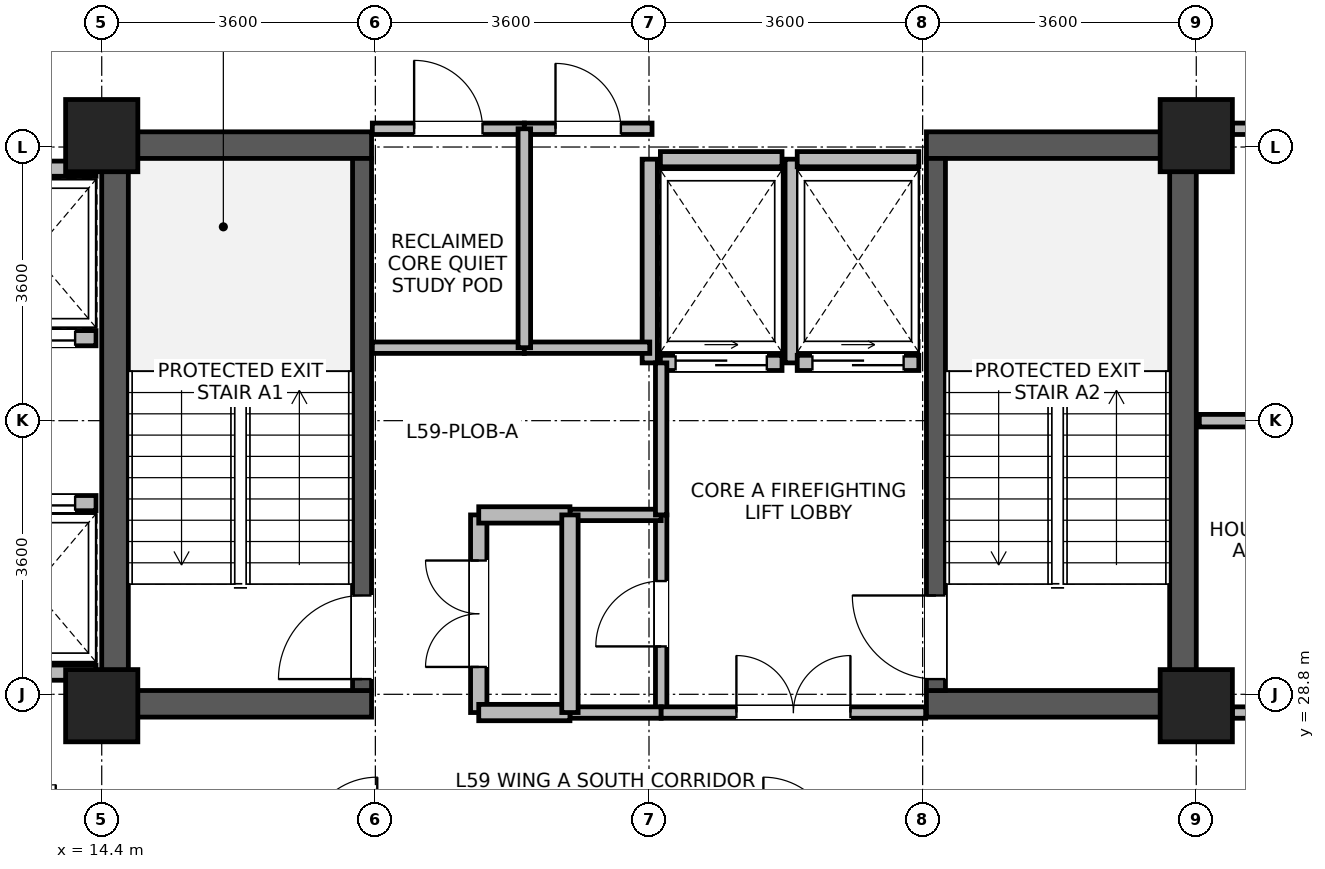
"""IFC4 building model, lengths in metres.
Left out: names, types, materials, properties, quantities, classifications, styles, units other than length and angle.
Written with IfcOpenShell. Run it as: python <this file> out.ifc"""

import sys

from ifc_helpers import new_model, si_unit, direction, frame, frame_2d, origin, origin_2d, place, context, subcontext, project, spatial, rectangle, extrude, source, transform, mapped, element, fill, save


model = new_model("IFC4")
c1 = context("Model", 3, precision=1e-05, world=origin(), true_north=direction((0.0, 1.0)))
c2 = subcontext(c1, "Body", "Model", "MODEL_VIEW")
j1 = project(units=[si_unit("LENGTHUNIT", "METRE"), si_unit("PLANEANGLEUNIT", "RADIAN")], contexts=[c1])
p1 = place(None, origin())
s1 = spatial("IfcSite", under=j1, at=p1, CompositionType="ELEMENT")
p2 = place(p1, origin())
s2 = spatial("IfcBuilding", under=s1, at=p2, CompositionType="ELEMENT")
p3 = place(p2, frame((0.0, 0.0, 231.4)))
s3 = spatial("IfcBuildingStorey", under=s2, at=p3, CompositionType="ELEMENT", Elevation=231.4)
for number, where, z_axis, x_axis in (
    (1, (14.575, 28.5, 0.0), (0.0, 0.0, 1.0), (0.0, 1.0, 0.0)),
    (2, (28.625, 28.5, 0.0), (0.0, 0.0, 1.0), (0.0, 1.0, 0.0)),
):
    element("IfcWall", number, at=place(p3, frame(where, z_axis=z_axis, x_axis=x_axis)), inside=s3, PredefinedType="SHEAR", context=c2, shape_type="SweptSolid", body=[
        extrude(rectangle(XDim=7.7, YDim=0.35, at=frame_2d((3.85, 0.0))), origin(), (0.0, 0.0, 1.0), 3.44),
    ])
for number, where, z_axis, x_axis in (
    (3, (14.75, 28.675, 0.0), (0.0, 0.0, 1.0), (1.0, 0.0, 0.0)),
    (4, (25.25, 28.675, 0.0), (0.0, 0.0, 1.0), (1.0, 0.0, 0.0)),
    (5, (14.75, 36.025, 0.0), (0.0, 0.0, 1.0), (1.0, 0.0, 0.0)),
    (6, (25.25, 36.025, 0.0), (0.0, 0.0, 1.0), (1.0, 0.0, 0.0)),
):
    element("IfcWall", number, at=place(p3, frame(where, z_axis=z_axis, x_axis=x_axis)), inside=s3, PredefinedType="SHEAR", context=c2, shape_type="SweptSolid", body=[
        extrude(rectangle(XDim=3.2, YDim=0.35, at=frame_2d((1.6, 0.0))), origin(), (0.0, 0.0, 1.0), 3.44),
    ])
p4 = place(p3, frame((17.825, 28.85, 0.0), z_axis=(0.0, 0.0, 1.0), x_axis=(0.0, 1.0, 0.0)))
e7 = element("IfcWall", 7, at=p4, inside=s3, PredefinedType="SHEAR", context=c2, shape_type="SweptSolid", body=[
    extrude(rectangle(XDim=7.0, YDim=0.25, at=frame_2d((3.5, 0.0))), origin(), (0.0, 0.0, 1.0), 3.44),
])
p5 = place(p4, frame((0.15, 0.0, 0.0)))
e8 = element("IfcOpeningElement", 8, at=p5, cuts=e7, PredefinedType="OPENING", context=c2, shape_type="SweptSolid", body=[
    extrude(rectangle(XDim=1.1, YDim=2.08, at=frame_2d((0.55, 1.04))), frame((0.0, 0.135, 0.0), z_axis=(0.0, -1.0, 0.0), x_axis=(1.0, 0.0, 0.0)), (0.0, 0.0, 1.0), 0.27),
])
p6 = place(p3, frame((25.375, 28.85, 0.0), z_axis=(0.0, 0.0, 1.0), x_axis=(0.0, 1.0, 0.0)))
e9 = element("IfcWall", 9, at=p6, inside=s3, PredefinedType="SHEAR", context=c2, shape_type="SweptSolid", body=[
    extrude(rectangle(XDim=7.0, YDim=0.25, at=frame_2d((3.5, 0.0))), origin(), (0.0, 0.0, 1.0), 3.44),
])
p7 = place(p6, frame((0.15, 0.0, 0.0)))
e10 = element("IfcOpeningElement", 10, at=p7, cuts=e9, PredefinedType="OPENING", context=c2, shape_type="SweptSolid", body=[
    extrude(rectangle(XDim=1.1, YDim=2.08, at=frame_2d((0.55, 1.04))), frame((0.0, 0.135, 0.0), z_axis=(0.0, -1.0, 0.0), x_axis=(1.0, 0.0, 0.0)), (0.0, 0.0, 1.0), 0.27),
])
m1 = source(origin(), c2, "Body", "SweptSolid", [
    extrude(rectangle(XDim=0.95, YDim=0.95, at=origin_2d()), origin(), (0.0, 0.0, 1.0), 3.7),
])
for number, where, z_axis, x_axis in (
    (11, (14.4, 28.65, 0.0), (0.0, 0.0, 1.0), (1.0, 0.0, 0.0)),
    (12, (14.4, 36.15, 0.0), (0.0, 0.0, 1.0), (1.0, 0.0, 0.0)),
    (13, (28.8, 28.65, 0.0), (0.0, 0.0, 1.0), (1.0, 0.0, 0.0)),
    (14, (28.8, 36.15, 0.0), (0.0, 0.0, 1.0), (1.0, 0.0, 0.0)),
):
    element("IfcColumn", number, at=place(p3, frame(where, z_axis=z_axis, x_axis=x_axis)), inside=s3, PredefinedType="COLUMN", context=c2, shape_type="MappedRepresentation", body=[
        mapped(m1, transform((0.0, 0.0, 0.0), x_axis=(1.0, 0.0, 0.0), y_axis=(0.0, 1.0, 0.0), z_axis=(0.0, 0.0, 1.0), scale=1.0)),
    ])
p8 = place(p3, frame((12.675, 33.485, 0.0), z_axis=(0.0, 0.0, 1.0), x_axis=(1.0, 0.0, 0.0)))
e15 = element("IfcWall", 15, at=p8, inside=s3, PredefinedType="PARTITIONING", context=c2, shape_type="SweptSolid", body=[
    extrude(rectangle(XDim=1.65, YDim=0.2, at=frame_2d((0.825, 0.0))), origin(), (0.0, 0.0, 1.0), 3.42),
])
p9 = place(p8, frame((0.275, 0.0, 0.0)))
e16 = element("IfcOpeningElement", 16, at=p9, cuts=e15, PredefinedType="OPENING", context=c2, shape_type="SweptSolid", body=[
    extrude(rectangle(XDim=1.1, YDim=2.12, at=frame_2d((0.55, 1.06))), frame((0.0, 0.11, 0.0), z_axis=(0.0, -1.0, 0.0), x_axis=(1.0, 0.0, 0.0)), (0.0, 0.0, 1.0), 0.22),
])
for number, where, z_axis, x_axis in (
    (17, (12.675, 35.715, 0.0), (0.0, 0.0, 1.0), (1.0, 0.0, 0.0)),
    (18, (12.675, 29.085, 0.0), (0.0, 0.0, 1.0), (1.0, 0.0, 0.0)),
):
    element("IfcWall", number, at=place(p3, frame(where, z_axis=z_axis, x_axis=x_axis)), inside=s3, PredefinedType="PARTITIONING", context=c2, shape_type="SweptSolid", body=[
        extrude(rectangle(XDim=1.65, YDim=0.2, at=frame_2d((0.825, 0.0))), origin(), (0.0, 0.0, 1.0), 3.42),
    ])
p10 = place(p3, frame((12.675, 31.315, 0.0), z_axis=(0.0, 0.0, 1.0), x_axis=(1.0, 0.0, 0.0)))
e19 = element("IfcWall", 19, at=p10, inside=s3, PredefinedType="PARTITIONING", context=c2, shape_type="SweptSolid", body=[
    extrude(rectangle(XDim=1.65, YDim=0.2, at=frame_2d((0.825, 0.0))), origin(), (0.0, 0.0, 1.0), 3.42),
])
p11 = place(p10, frame((0.275, 0.0, 0.0)))
e20 = element("IfcOpeningElement", 20, at=p11, cuts=e19, PredefinedType="OPENING", context=c2, shape_type="SweptSolid", body=[
    extrude(rectangle(XDim=1.1, YDim=2.12, at=frame_2d((0.55, 1.06))), frame((0.0, 0.11, 0.0), z_axis=(0.0, -1.0, 0.0), x_axis=(1.0, 0.0, 0.0)), (0.0, 0.0, 1.0), 0.22),
])
p12 = place(p3, frame((21.75, 33.16, 0.0), z_axis=(0.0, 0.0, 1.0), x_axis=(1.0, 0.0, 0.0)))
e21 = element("IfcWall", 21, at=p12, inside=s3, PredefinedType="PARTITIONING", context=c2, shape_type="SweptSolid", body=[
    extrude(rectangle(XDim=1.6, YDim=0.2, at=frame_2d((0.8, 0.0))), origin(), (0.0, 0.0, 1.0), 3.42),
])
p13 = place(p12, frame((0.2, 0.0, 0.0)))
e22 = element("IfcOpeningElement", 22, at=p13, cuts=e21, PredefinedType="OPENING", context=c2, shape_type="SweptSolid", body=[
    extrude(rectangle(XDim=1.2, YDim=2.12, at=frame_2d((0.6, 1.06))), frame((0.0, 0.11, 0.0), z_axis=(0.0, -1.0, 0.0), x_axis=(1.0, 0.0, 0.0)), (0.0, 0.0, 1.0), 0.22),
])
p14 = place(p3, frame((21.75, 35.84, 0.0), z_axis=(0.0, 0.0, 1.0), x_axis=(1.0, 0.0, 0.0)))
e23 = element("IfcWall", 23, at=p14, inside=s3, PredefinedType="PARTITIONING", context=c2, shape_type="SweptSolid", body=[
    extrude(rectangle(XDim=1.6, YDim=0.2, at=frame_2d((0.8, 0.0))), origin(), (0.0, 0.0, 1.0), 2.52),
])
for number, where, z_axis, x_axis in (
    (24, (21.61, 33.16, 0.0), (0.0, 0.0, 1.0), (0.0, 1.0, 0.0)),
    (25, (23.49, 33.16, 0.0), (0.0, 0.0, 1.0), (0.0, 1.0, 0.0)),
):
    element("IfcWall", number, at=place(p3, frame(where, z_axis=z_axis, x_axis=x_axis)), inside=s3, PredefinedType="PARTITIONING", context=c2, shape_type="SweptSolid", body=[
        extrude(rectangle(XDim=2.68, YDim=0.2, at=frame_2d((1.34, 0.0))), origin(), (0.0, 0.0, 1.0), 3.42),
    ])
p15 = place(p3, frame((23.55, 33.16, 0.0), z_axis=(0.0, 0.0, 1.0), x_axis=(1.0, 0.0, 0.0)))
e26 = element("IfcWall", 26, at=p15, inside=s3, PredefinedType="PARTITIONING", context=c2, shape_type="SweptSolid", body=[
    extrude(rectangle(XDim=1.6, YDim=0.2, at=frame_2d((0.8, 0.0))), origin(), (0.0, 0.0, 1.0), 3.42),
])
p16 = place(p15, frame((0.2, 0.0, 0.0)))
e27 = element("IfcOpeningElement", 27, at=p16, cuts=e26, PredefinedType="OPENING", context=c2, shape_type="SweptSolid", body=[
    extrude(rectangle(XDim=1.2, YDim=2.12, at=frame_2d((0.6, 1.06))), frame((0.0, 0.11, 0.0), z_axis=(0.0, -1.0, 0.0), x_axis=(1.0, 0.0, 0.0)), (0.0, 0.0, 1.0), 0.22),
])
p17 = place(p3, frame((23.55, 35.84, 0.0), z_axis=(0.0, 0.0, 1.0), x_axis=(1.0, 0.0, 0.0)))
e28 = element("IfcWall", 28, at=p17, inside=s3, PredefinedType="PARTITIONING", context=c2, shape_type="SweptSolid", body=[
    extrude(rectangle(XDim=1.6, YDim=0.2, at=frame_2d((0.8, 0.0))), origin(), (0.0, 0.0, 1.0), 2.52),
])
p18 = place(p3, frame((29.275, 36.24, 0.0), z_axis=(0.0, 0.0, 1.0), x_axis=(1.0, 0.0, 0.0)))
e29 = element("IfcWall", 29, at=p18, inside=s3, PredefinedType="PARTITIONING", context=c2, shape_type="SweptSolid", body=[
    extrude(rectangle(XDim=4.085, YDim=0.15, at=frame_2d((2.042, 0.0))), origin(), (0.0, 0.0, 1.0), 2.87),
])
p19 = place(p18, frame((1.393, 0.0, 0.0)))
e30 = element("IfcOpeningElement", 30, at=p19, cuts=e29, PredefinedType="OPENING", context=c2, shape_type="SweptSolid", body=[
    extrude(rectangle(XDim=1.3, YDim=2.12, at=frame_2d((0.65, 1.06))), frame((0.0, 0.085, 0.0), z_axis=(0.0, -1.0, 0.0), x_axis=(1.0, 0.0, 0.0)), (0.0, 0.0, 1.0), 0.17),
])
p20 = place(p3, frame((19.36, 28.56, 0.0), z_axis=(0.0, 0.0, 1.0), x_axis=(0.0, 1.0, 0.0)))
e31 = element("IfcWall", 31, at=p20, inside=s3, PredefinedType="PARTITIONING", context=c2, shape_type="SweptSolid", body=[
    extrude(rectangle(XDim=2.6, YDim=0.215, at=frame_2d((1.3, 0.0))), origin(), (0.0, 0.0, 1.0), 3.42),
])
p21 = place(p20, frame((0.6, 0.0, 0.0)))
e32 = element("IfcOpeningElement", 32, at=p21, cuts=e31, PredefinedType="OPENING", context=c2, shape_type="SweptSolid", body=[
    extrude(rectangle(XDim=1.4, YDim=2.15, at=frame_2d((0.7, 1.075))), frame((0.0, 0.118, 0.0), z_axis=(0.0, -1.0, 0.0), x_axis=(1.0, 0.0, 0.0)), (0.0, 0.0, 1.0), 0.235),
])
p22 = place(p3, frame((21.76, 28.56, 0.0), z_axis=(0.0, 0.0, 1.0), x_axis=(0.0, 1.0, 0.0)))
e33 = element("IfcWall", 33, at=p22, inside=s3, PredefinedType="PARTITIONING", context=c2, shape_type="SweptSolid", body=[
    extrude(rectangle(XDim=2.6, YDim=0.15, at=frame_2d((1.3, 0.0))), origin(), (0.0, 0.0, 1.0), 3.42),
])
p23 = place(p22, frame((0.87, 0.0, 0.0)))
e34 = element("IfcOpeningElement", 34, at=p23, cuts=e33, PredefinedType="OPENING", context=c2, shape_type="SweptSolid", body=[
    extrude(rectangle(XDim=0.86, YDim=2.02, at=frame_2d((0.43, 1.01))), frame((0.0, 0.085, 0.0), z_axis=(0.0, -1.0, 0.0), x_axis=(1.0, 0.0, 0.0)), (0.0, 0.0, 1.0), 0.17),
])
p24 = place(p3, frame((29.275, 28.56, 0.0), z_axis=(0.0, 0.0, 1.0), x_axis=(1.0, 0.0, 0.0)))
e35 = element("IfcWall", 35, at=p24, inside=s3, PredefinedType="PARTITIONING", context=c2, shape_type="SweptSolid", body=[
    extrude(rectangle(XDim=1.825, YDim=0.15, at=frame_2d((0.913, 0.0))), origin(), (0.0, 0.0, 1.0), 2.87),
])
p25 = place(p24, frame((0.482, 0.0, 0.0)))
e36 = element("IfcOpeningElement", 36, at=p25, cuts=e35, PredefinedType="OPENING", context=c2, shape_type="SweptSolid", body=[
    extrude(rectangle(XDim=0.86, YDim=2.02, at=frame_2d((0.43, 1.01))), frame((0.0, 0.085, 0.0), z_axis=(0.0, -1.0, 0.0), x_axis=(1.0, 0.0, 0.0)), (0.0, 0.0, 1.0), 0.17),
])
p26 = place(p3, frame((17.96, 33.36, 0.0), z_axis=(0.0, 0.0, 1.0), x_axis=(1.0, 0.0, 0.0)))
e37 = element("IfcWall", 37, at=p26, inside=s3, PredefinedType="PARTITIONING", context=c2, shape_type="SweptSolid", body=[
    extrude(rectangle(XDim=2.0, YDim=0.15, at=frame_2d((1.0, 0.0))), origin(), (0.0, 0.0, 1.0), 3.42),
])
p27 = place(p3, frame((17.96, 36.24, 0.0), z_axis=(0.0, 0.0, 1.0), x_axis=(1.0, 0.0, 0.0)))
e38 = element("IfcWall", 38, at=p27, inside=s3, PredefinedType="PARTITIONING", context=c2, shape_type="SweptSolid", body=[
    extrude(rectangle(XDim=2.0, YDim=0.15, at=frame_2d((1.0, 0.0))), origin(), (0.0, 0.0, 1.0), 2.52),
])
p28 = place(p27, frame((0.55, 0.0, 0.0)))
e39 = element("IfcOpeningElement", 39, at=p28, cuts=e38, PredefinedType="OPENING", context=c2, shape_type="SweptSolid", body=[
    extrude(rectangle(XDim=0.9, YDim=2.08, at=frame_2d((0.45, 1.04))), frame((0.0, 0.085, 0.0), z_axis=(0.0, -1.0, 0.0), x_axis=(1.0, 0.0, 0.0)), (0.0, 0.0, 1.0), 0.17),
])
p29 = place(p3, frame((19.96, 33.36, 0.0), z_axis=(0.0, 0.0, 1.0), x_axis=(1.0, 0.0, 0.0)))
e40 = element("IfcWall", 40, at=p29, inside=s3, PredefinedType="PARTITIONING", context=c2, shape_type="SweptSolid", body=[
    extrude(rectangle(XDim=1.65, YDim=0.15, at=frame_2d((0.825, 0.0))), origin(), (0.0, 0.0, 1.0), 3.42),
])
p30 = place(p3, frame((19.96, 36.24, 0.0), z_axis=(0.0, 0.0, 1.0), x_axis=(1.0, 0.0, 0.0)))
e41 = element("IfcWall", 41, at=p30, inside=s3, PredefinedType="PARTITIONING", context=c2, shape_type="SweptSolid", body=[
    extrude(rectangle(XDim=1.68, YDim=0.15, at=frame_2d((0.84, 0.0))), origin(), (0.0, 0.0, 1.0), 2.52),
])
p31 = place(p30, frame((0.41, 0.0, 0.0)))
e42 = element("IfcOpeningElement", 42, at=p31, cuts=e41, PredefinedType="OPENING", context=c2, shape_type="SweptSolid", body=[
    extrude(rectangle(XDim=0.86, YDim=2.02, at=frame_2d((0.43, 1.01))), frame((0.0, 0.085, 0.0), z_axis=(0.0, -1.0, 0.0), x_axis=(1.0, 0.0, 0.0)), (0.0, 0.0, 1.0), 0.17),
])
p32 = place(p3, frame((20.56, 28.56, 0.0), z_axis=(0.0, 0.0, 1.0), x_axis=(1.0, 0.0, 0.0)))
e43 = element("IfcWall", 43, at=p32, inside=s3, PredefinedType="PARTITIONING", context=c2, shape_type="SweptSolid", body=[
    extrude(rectangle(XDim=1.2, YDim=0.15, at=frame_2d((0.6, 0.0))), origin(), (0.0, 0.0, 1.0), 2.52),
])
p33 = place(p3, frame((20.56, 31.16, 0.0), z_axis=(0.0, 0.0, 1.0), x_axis=(1.0, 0.0, 0.0)))
e44 = element("IfcWall", 44, at=p33, inside=s3, PredefinedType="PARTITIONING", context=c2, shape_type="SweptSolid", body=[
    extrude(rectangle(XDim=1.2, YDim=0.15, at=frame_2d((0.6, 0.0))), origin(), (0.0, 0.0, 1.0), 3.42),
])
p34 = place(p3, frame((19.36, 28.56, 0.0), z_axis=(0.0, 0.0, 1.0), x_axis=(1.0, 0.0, 0.0)))
e45 = element("IfcWall", 45, at=p34, inside=s3, PredefinedType="PARTITIONING", context=c2, shape_type="SweptSolid", body=[
    extrude(rectangle(XDim=1.2, YDim=0.215, at=frame_2d((0.6, 0.0))), origin(), (0.0, 0.0, 1.0), 2.52),
])
p35 = place(p3, frame((19.36, 31.16, 0.0), z_axis=(0.0, 0.0, 1.0), x_axis=(1.0, 0.0, 0.0)))
e46 = element("IfcWall", 46, at=p35, inside=s3, PredefinedType="PARTITIONING", context=c2, shape_type="SweptSolid", body=[
    extrude(rectangle(XDim=1.2, YDim=0.215, at=frame_2d((0.6, 0.0))), origin(), (0.0, 0.0, 1.0), 3.42),
])
p36 = place(p3, frame((21.76, 28.56, 0.0), z_axis=(0.0, 0.0, 1.0), x_axis=(1.0, 0.0, 0.0)))
e47 = element("IfcWall", 47, at=p36, inside=s3, PredefinedType="PARTITIONING", context=c2, shape_type="SweptSolid", body=[
    extrude(rectangle(XDim=3.48, YDim=0.15, at=frame_2d((1.74, 0.0))), origin(), (0.0, 0.0, 1.0), 2.52),
])
p37 = place(p36, frame((0.99, 0.0, 0.0)))
e48 = element("IfcOpeningElement", 48, at=p37, cuts=e47, PredefinedType="OPENING", context=c2, shape_type="SweptSolid", body=[
    extrude(rectangle(XDim=1.5, YDim=2.1, at=frame_2d((0.75, 1.05))), frame((0.0, 0.085, 0.0), z_axis=(0.0, -1.0, 0.0), x_axis=(1.0, 0.0, 0.0)), (0.0, 0.0, 1.0), 0.17),
])
p38 = place(p3, frame((19.96, 33.36, 0.0), z_axis=(0.0, 0.0, 1.0), x_axis=(0.0, 1.0, 0.0)))
e49 = element("IfcWall", 49, at=p38, inside=s3, PredefinedType="PARTITIONING", context=c2, shape_type="SweptSolid", body=[
    extrude(rectangle(XDim=2.88, YDim=0.165, at=frame_2d((1.44, 0.0))), origin(), (0.0, 0.0, 1.0), 3.42),
])
p39 = place(p3, frame((20.56, 28.56, 0.0), z_axis=(0.0, 0.0, 1.0), x_axis=(0.0, 1.0, 0.0)))
e50 = element("IfcWall", 50, at=p39, inside=s3, PredefinedType="PARTITIONING", context=c2, shape_type="SweptSolid", body=[
    extrude(rectangle(XDim=2.6, YDim=0.215, at=frame_2d((1.3, 0.0))), origin(), (0.0, 0.0, 1.0), 3.42),
])
p40 = place(p3, frame((28.84, 32.4, 0.0), z_axis=(0.0, 0.0, 1.0), x_axis=(1.0, 0.0, 0.0)))
e51 = element("IfcWall", 51, at=p40, inside=s3, PredefinedType="PARTITIONING", context=c2, shape_type="SweptSolid", body=[
    extrude(rectangle(XDim=2.26, YDim=0.165, at=frame_2d((1.13, 0.0))), origin(), (0.0, 0.0, 1.0), 3.42),
])
p41 = place(p3, frame((21.76, 31.16, 0.0), z_axis=(0.0, 0.0, 1.0), x_axis=(0.0, 1.0, 0.0)))
e52 = element("IfcWall", 52, at=p41, inside=s3, PredefinedType="PARTITIONING", context=c2, shape_type="SweptSolid", body=[
    extrude(rectangle(XDim=2.0, YDim=0.15, at=frame_2d((1.0, 0.0))), origin(), (0.0, 0.0, 1.0), 3.42),
])
p42 = place(p5, origin())
e53 = element("IfcDoor", 53, at=p42, inside=s3, OperationType="SINGLE_SWING_LEFT", PredefinedType="DOOR", context=c2, shape_type="SweptSolid", body=[
    extrude(rectangle(XDim=1.1, YDim=2.08, at=frame_2d((0.55, 1.04))), frame((0.0, 0.025, 0.0), z_axis=(0.0, -1.0, 0.0), x_axis=(1.0, 0.0, 0.0)), (0.0, 0.0, 1.0), 0.05),
])
fill(e8, e53)
p43 = place(p7, origin())
e54 = element("IfcDoor", 54, at=p43, inside=s3, OperationType="SINGLE_SWING_RIGHT", PredefinedType="DOOR", context=c2, shape_type="SweptSolid", body=[
    extrude(rectangle(XDim=1.1, YDim=2.08, at=frame_2d((0.55, 1.04))), frame((0.0, 0.025, 0.0), z_axis=(0.0, -1.0, 0.0), x_axis=(1.0, 0.0, 0.0)), (0.0, 0.0, 1.0), 0.05),
])
fill(e10, e54)
p44 = place(p9, origin())
e55 = element("IfcDoor", 55, at=p44, inside=s3, OperationType="SLIDING_TO_LEFT", PredefinedType="DOOR", context=c2, shape_type="SweptSolid", body=[
    extrude(rectangle(XDim=1.1, YDim=2.12, at=frame_2d((0.55, 1.06))), frame((0.0, 0.025, 0.0), z_axis=(0.0, -1.0, 0.0), x_axis=(1.0, 0.0, 0.0)), (0.0, 0.0, 1.0), 0.05),
])
fill(e16, e55)
p45 = place(p11, origin())
e56 = element("IfcDoor", 56, at=p45, inside=s3, OperationType="SLIDING_TO_LEFT", PredefinedType="DOOR", context=c2, shape_type="SweptSolid", body=[
    extrude(rectangle(XDim=1.1, YDim=2.12, at=frame_2d((0.55, 1.06))), frame((0.0, 0.025, 0.0), z_axis=(0.0, -1.0, 0.0), x_axis=(1.0, 0.0, 0.0)), (0.0, 0.0, 1.0), 0.05),
])
fill(e20, e56)
p46 = place(p13, origin())
e57 = element("IfcDoor", 57, at=p46, inside=s3, OperationType="SLIDING_TO_RIGHT", PredefinedType="DOOR", context=c2, shape_type="SweptSolid", body=[
    extrude(rectangle(XDim=1.2, YDim=2.12, at=frame_2d((0.6, 1.06))), frame((0.0, 0.025, 0.0), z_axis=(0.0, -1.0, 0.0), x_axis=(1.0, 0.0, 0.0)), (0.0, 0.0, 1.0), 0.05),
])
fill(e22, e57)
p47 = place(p16, origin())
e58 = element("IfcDoor", 58, at=p47, inside=s3, OperationType="SLIDING_TO_RIGHT", PredefinedType="DOOR", context=c2, shape_type="SweptSolid", body=[
    extrude(rectangle(XDim=1.2, YDim=2.12, at=frame_2d((0.6, 1.06))), frame((0.0, 0.025, 0.0), z_axis=(0.0, -1.0, 0.0), x_axis=(1.0, 0.0, 0.0)), (0.0, 0.0, 1.0), 0.05),
])
fill(e27, e58)
p48 = place(p21, origin())
e59 = element("IfcDoor", 59, at=p48, inside=s3, OperationType="DOUBLE_DOOR_SINGLE_SWING", PredefinedType="DOOR", context=c2, shape_type="SweptSolid", body=[
    extrude(rectangle(XDim=1.4, YDim=2.15, at=frame_2d((0.7, 1.075))), frame((0.0, 0.025, 0.0), z_axis=(0.0, -1.0, 0.0), x_axis=(1.0, 0.0, 0.0)), (0.0, 0.0, 1.0), 0.05),
])
fill(e32, e59)
p49 = place(p23, origin())
e60 = element("IfcDoor", 60, at=p49, inside=s3, OperationType="SINGLE_SWING_LEFT", PredefinedType="DOOR", context=c2, shape_type="SweptSolid", body=[
    extrude(rectangle(XDim=0.86, YDim=2.02, at=frame_2d((0.43, 1.01))), frame((0.0, 0.025, 0.0), z_axis=(0.0, -1.0, 0.0), x_axis=(1.0, 0.0, 0.0)), (0.0, 0.0, 1.0), 0.05),
])
fill(e34, e60)
p50 = place(p28, origin())
e61 = element("IfcDoor", 61, at=p50, inside=s3, OperationType="SINGLE_SWING_LEFT", PredefinedType="DOOR", context=c2, shape_type="SweptSolid", body=[
    extrude(rectangle(XDim=0.9, YDim=2.08, at=frame_2d((0.45, 1.04))), frame((0.0, 0.025, 0.0), z_axis=(0.0, -1.0, 0.0), x_axis=(1.0, 0.0, 0.0)), (0.0, 0.0, 1.0), 0.05),
])
fill(e39, e61)
p51 = place(p31, origin())
e62 = element("IfcDoor", 62, at=p51, inside=s3, OperationType="SINGLE_SWING_LEFT", PredefinedType="DOOR", context=c2, shape_type="SweptSolid", body=[
    extrude(rectangle(XDim=0.86, YDim=2.02, at=frame_2d((0.43, 1.01))), frame((0.0, 0.025, 0.0), z_axis=(0.0, -1.0, 0.0), x_axis=(1.0, 0.0, 0.0)), (0.0, 0.0, 1.0), 0.05),
])
fill(e42, e62)
p52 = place(p37, origin())
e63 = element("IfcDoor", 63, at=p52, inside=s3, OperationType="DOUBLE_DOOR_SINGLE_SWING", PredefinedType="DOOR", context=c2, shape_type="SweptSolid", body=[
    extrude(rectangle(XDim=1.5, YDim=2.1, at=frame_2d((0.75, 1.05))), frame((0.0, 0.025, 0.0), z_axis=(0.0, -1.0, 0.0), x_axis=(1.0, 0.0, 0.0)), (0.0, 0.0, 1.0), 0.05),
])
fill(e48, e63)
save(model, sys.argv[1])
